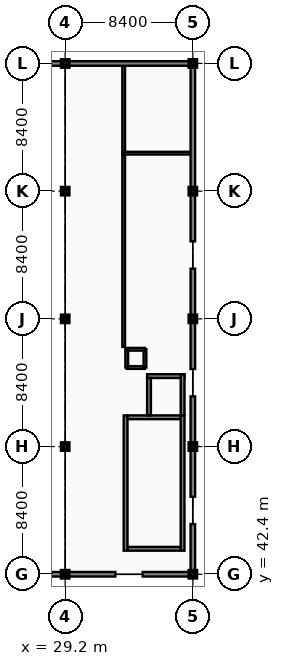
"""IFC4 building model, lengths in metres.
Left out: names, types, materials, properties, quantities, classifications, styles, units other than length and angle.
Written with IfcOpenShell. Run it as: python <this file> out.ifc"""

import sys

from ifc_helpers import new_model, si_unit, direction, frame, frame_2d, origin, origin_2d, place, context, subcontext, project, spatial, rectangle, extrude, element, fill, save


model = new_model("IFC4")
c1 = context("Model", 3, precision=1e-05, world=origin(), true_north=direction((0.0, 1.0)))
c2 = subcontext(c1, "Body", "Model", "MODEL_VIEW")
j1 = project(units=[si_unit("LENGTHUNIT", "METRE"), si_unit("PLANEANGLEUNIT", "RADIAN")], contexts=[c1])
p1 = place(None, origin())
s1 = spatial("IfcSite", under=j1, at=p1, CompositionType="ELEMENT")
p2 = place(p1, origin())
s2 = spatial("IfcBuilding", under=s1, at=p2, CompositionType="ELEMENT")
p3 = place(p2, frame((0.0, 0.0, 9.6)))
s3 = spatial("IfcBuildingStorey", under=s2, at=p3, CompositionType="ELEMENT", Elevation=9.6)
for number, where, z_axis, x_axis in (
    (1, (29.2, 42.4, 0.0), (0.0, 0.0, 1.0), (1.0, 0.0, 0.0)),
    (2, (29.2, 50.8, 0.0), (0.0, 0.0, 1.0), (1.0, 0.0, 0.0)),
    (3, (29.2, 59.2, 0.0), (0.0, 0.0, 1.0), (1.0, 0.0, 0.0)),
    (4, (29.2, 67.6, 0.0), (0.0, 0.0, 1.0), (1.0, 0.0, 0.0)),
    (5, (29.2, 76.0, 0.0), (0.0, 0.0, 1.0), (1.0, 0.0, 0.0)),
    (6, (37.6, 42.4, 0.0), (0.0, 0.0, 1.0), (1.0, 0.0, 0.0)),
    (7, (37.6, 50.8, 0.0), (0.0, 0.0, 1.0), (1.0, 0.0, 0.0)),
    (8, (37.6, 59.2, 0.0), (0.0, 0.0, 1.0), (1.0, 0.0, 0.0)),
    (9, (37.6, 67.6, 0.0), (0.0, 0.0, 1.0), (1.0, 0.0, 0.0)),
    (10, (37.6, 76.0, 0.0), (0.0, 0.0, 1.0), (1.0, 0.0, 0.0)),
):
    element("IfcColumn", number, at=place(p3, frame(where, z_axis=z_axis, x_axis=x_axis)), inside=s3, PredefinedType="COLUMN", context=c2, shape_type="SweptSolid", body=[
        extrude(rectangle(XDim=0.4, YDim=0.4, at=origin_2d()), origin(), (0.0, 0.0, 1.0), 4.2),
    ])
p4 = place(p3, frame((33.05, 57.35, 0.0), z_axis=(0.0, 0.0, 1.0), x_axis=(0.0, 1.0, 0.0)))
e11 = element("IfcWall", 11, at=p4, inside=s3, PredefinedType="PARTITIONING", context=c2, shape_type="SweptSolid", body=[
    extrude(rectangle(XDim=12.75, YDim=0.18, at=frame_2d((6.375, 0.0))), origin(), (0.0, 0.0, 1.0), 3.31),
])
p5 = place(p4, frame((5.875, 0.0, -0.01)))
e12 = element("IfcOpeningElement", 12, at=p5, cuts=e11, PredefinedType="OPENING", context=c2, shape_type="SweptSolid", body=[
    extrude(rectangle(XDim=1.0, YDim=2.16, at=frame_2d((0.5, 1.08))), frame((0.0, 0.1, 0.0), z_axis=(0.0, -1.0, 0.0), x_axis=(1.0, 0.0, 0.0)), (0.0, 0.0, 1.0), 0.2),
])
p6 = place(p3, frame((33.05, 70.1, 0.0), z_axis=(0.0, 0.0, 1.0), x_axis=(0.0, 1.0, 0.0)))
e13 = element("IfcWall", 13, at=p6, inside=s3, PredefinedType="PARTITIONING", context=c2, shape_type="SweptSolid", body=[
    extrude(rectangle(XDim=5.76, YDim=0.18, at=frame_2d((2.88, 0.0))), origin(), (0.0, 0.0, 1.0), 3.31),
])
p7 = place(p6, frame((2.38, 0.0, -0.01)))
e14 = element("IfcOpeningElement", 14, at=p7, cuts=e13, PredefinedType="OPENING", context=c2, shape_type="SweptSolid", body=[
    extrude(rectangle(XDim=1.0, YDim=2.16, at=frame_2d((0.5, 1.08))), frame((0.0, 0.1, 0.0), z_axis=(0.0, -1.0, 0.0), x_axis=(1.0, 0.0, 0.0)), (0.0, 0.0, 1.0), 0.2),
])
p8 = place(p3, frame((33.05, 70.1, 0.0), z_axis=(0.0, 0.0, 1.0), x_axis=(1.0, 0.0, 0.0)))
e15 = element("IfcWall", 15, at=p8, inside=s3, PredefinedType="PARTITIONING", context=c2, shape_type="SweptSolid", body=[
    extrude(rectangle(XDim=4.41, YDim=0.18, at=frame_2d((2.205, 0.0))), origin(), (0.0, 0.0, 1.0), 3.39),
])
for number, where, z_axis, x_axis in (
    (16, (25.9, 42.4, 0.0), (0.0, 0.0, 1.0), (1.0, 0.0, 0.0)),
    (17, (29.2, 42.4, 0.0), (0.0, 0.0, 1.0), (1.0, 0.0, 0.0)),
    (18, (34.3, 42.4, 0.0), (0.0, 0.0, 1.0), (1.0, 0.0, 0.0)),
    (19, (29.2, 76.0, 0.0), (0.0, 0.0, 1.0), (-1.0, 0.0, 0.0)),
):
    element("IfcWall", number, at=place(p3, frame(where, z_axis=z_axis, x_axis=x_axis)), inside=s3, PredefinedType="SOLIDWALL", context=c2, shape_type="SweptSolid", body=[
        extrude(rectangle(XDim=3.3, YDim=0.3, at=frame_2d((1.65, 0.0))), origin(), (0.0, 0.0, 1.0), 3.31),
    ])
p9 = place(p3, frame((37.6, 76.0, 0.0), z_axis=(0.0, 0.0, 1.0), x_axis=(-1.0, 0.0, 0.0)))
e20 = element("IfcWall", 20, at=p9, inside=s3, PredefinedType="SOLIDWALL", context=c2, shape_type="SweptSolid", body=[
    extrude(rectangle(XDim=8.4, YDim=0.3, at=frame_2d((4.2, 0.0))), origin(), (0.0, 0.0, 1.0), 3.31),
])
p10 = place(p9, frame((0.46, 0.0, 0.85)))
e21 = element("IfcOpeningElement", 21, at=p10, cuts=e20, PredefinedType="OPENING", context=c2, shape_type="SweptSolid", body=[
    extrude(rectangle(XDim=0.9, YDim=2.1, at=frame_2d((0.45, 1.05))), frame((0.0, 0.16, 0.0), z_axis=(0.0, -1.0, 0.0), x_axis=(1.0, 0.0, 0.0)), (0.0, 0.0, 1.0), 0.32),
])
p11 = place(p9, frame((6.86, 0.0, 0.85)))
e22 = element("IfcOpeningElement", 22, at=p11, cuts=e20, PredefinedType="OPENING", context=c2, shape_type="SweptSolid", body=[
    extrude(rectangle(XDim=0.9, YDim=2.1, at=frame_2d((0.45, 1.05))), frame((0.0, 0.16, 0.0), z_axis=(0.0, -1.0, 0.0), x_axis=(1.0, 0.0, 0.0)), (0.0, 0.0, 1.0), 0.32),
])
for number, where, z_axis, x_axis in (
    (23, (37.6, 42.4, 0.0), (0.0, 0.0, 1.0), (0.0, 1.0, 0.0)),
    (24, (37.6, 47.5, 0.0), (0.0, 0.0, 1.0), (0.0, 1.0, 0.0)),
    (25, (37.6, 50.8, 0.0), (0.0, 0.0, 1.0), (0.0, 1.0, 0.0)),
    (26, (37.6, 55.9, 0.0), (0.0, 0.0, 1.0), (0.0, 1.0, 0.0)),
    (27, (37.6, 59.2, 0.0), (0.0, 0.0, 1.0), (0.0, 1.0, 0.0)),
    (28, (37.6, 64.3, 0.0), (0.0, 0.0, 1.0), (0.0, 1.0, 0.0)),
):
    element("IfcWall", number, at=place(p3, frame(where, z_axis=z_axis, x_axis=x_axis)), inside=s3, PredefinedType="SOLIDWALL", context=c2, shape_type="SweptSolid", body=[
        extrude(rectangle(XDim=3.3, YDim=0.3, at=frame_2d((1.65, 0.0))), origin(), (0.0, 0.0, 1.0), 3.31),
    ])
p12 = place(p3, frame((37.6, 67.6, 0.0), z_axis=(0.0, 0.0, 1.0), x_axis=(0.0, 1.0, 0.0)))
e29 = element("IfcWall", 29, at=p12, inside=s3, PredefinedType="SOLIDWALL", context=c2, shape_type="SweptSolid", body=[
    extrude(rectangle(XDim=8.4, YDim=0.3, at=frame_2d((4.2, 0.0))), origin(), (0.0, 0.0, 1.0), 3.31),
])
p13 = place(p12, frame((0.46, 0.0, 0.85)))
e30 = element("IfcOpeningElement", 30, at=p13, cuts=e29, PredefinedType="OPENING", context=c2, shape_type="SweptSolid", body=[
    extrude(rectangle(XDim=0.9, YDim=2.1, at=frame_2d((0.45, 1.05))), frame((0.0, 0.16, 0.0), z_axis=(0.0, -1.0, 0.0), x_axis=(1.0, 0.0, 0.0)), (0.0, 0.0, 1.0), 0.32),
])
p14 = place(p12, frame((6.86, 0.0, 0.85)))
e31 = element("IfcOpeningElement", 31, at=p14, cuts=e29, PredefinedType="OPENING", context=c2, shape_type="SweptSolid", body=[
    extrude(rectangle(XDim=0.9, YDim=2.1, at=frame_2d((0.45, 1.05))), frame((0.0, 0.16, 0.0), z_axis=(0.0, -1.0, 0.0), x_axis=(1.0, 0.0, 0.0)), (0.0, 0.0, 1.0), 0.32),
])
p15 = place(p3, frame((33.3, 44.075, 0.0), z_axis=(0.0, 0.0, 1.0), x_axis=(1.0, 0.0, 0.0)))
e32 = element("IfcWall", 32, at=p15, inside=s3, PredefinedType="SHEAR", context=c2, shape_type="SweptSolid", body=[
    extrude(rectangle(XDim=3.5, YDim=0.25, at=frame_2d((1.75, 0.0))), origin(), (0.0, 0.0, 1.0), 4.2),
])
p16 = place(p15, frame((1.1, 0.0, -0.01)))
e33 = element("IfcOpeningElement", 33, at=p16, cuts=e32, PredefinedType="OPENING", context=c2, shape_type="SweptSolid", body=[
    extrude(rectangle(XDim=1.3, YDim=2.16, at=frame_2d((0.65, 1.08))), frame((0.0, 0.135, 0.0), z_axis=(0.0, -1.0, 0.0), x_axis=(1.0, 0.0, 0.0)), (0.0, 0.0, 1.0), 0.27),
])
p17 = place(p3, frame((33.175, 43.95, 0.0), z_axis=(0.0, 0.0, 1.0), x_axis=(0.0, 1.0, 0.0)))
e34 = element("IfcWall", 34, at=p17, inside=s3, PredefinedType="SHEAR", context=c2, shape_type="SweptSolid", body=[
    extrude(rectangle(XDim=8.9, YDim=0.25, at=frame_2d((4.45, 0.0))), origin(), (0.0, 0.0, 1.0), 4.2),
])
p18 = place(p3, frame((36.8, 52.725, 0.0), z_axis=(0.0, 0.0, 1.0), x_axis=(-1.0, 0.0, 0.0)))
e35 = element("IfcWall", 35, at=p18, inside=s3, PredefinedType="SHEAR", context=c2, shape_type="SweptSolid", body=[
    extrude(rectangle(XDim=3.5, YDim=0.25, at=frame_2d((1.75, 0.0))), origin(), (0.0, 0.0, 1.0), 4.2),
])
p19 = place(p3, frame((36.925, 43.95, 0.0), z_axis=(0.0, 0.0, 1.0), x_axis=(0.0, 1.0, 0.0)))
e36 = element("IfcWall", 36, at=p19, inside=s3, PredefinedType="SHEAR", context=c2, shape_type="SweptSolid", body=[
    extrude(rectangle(XDim=8.9, YDim=0.25, at=frame_2d((4.45, 0.0))), origin(), (0.0, 0.0, 1.0), 4.2),
])
p20 = place(p3, frame((34.59, 55.435, 0.0), z_axis=(0.0, 0.0, 1.0), x_axis=(1.0, 0.0, 0.0)))
e37 = element("IfcWall", 37, at=p20, inside=s3, PredefinedType="SHEAR", context=c2, shape_type="SweptSolid", body=[
    extrude(rectangle(XDim=2.46, YDim=0.25, at=frame_2d((1.23, 0.0))), origin(), (0.0, 0.0, 1.0), 4.2),
])
p21 = place(p3, frame((34.715, 52.85, 0.0), z_axis=(0.0, 0.0, 1.0), x_axis=(0.0, 1.0, 0.0)))
e38 = element("IfcWall", 38, at=p21, inside=s3, PredefinedType="SHEAR", context=c2, shape_type="SweptSolid", body=[
    extrude(rectangle(XDim=2.46, YDim=0.25, at=frame_2d((1.23, 0.0))), origin(), (0.0, 0.0, 1.0), 4.2),
])
p22 = place(p21, frame((0.68, 0.0, -0.01)))
e39 = element("IfcOpeningElement", 39, at=p22, cuts=e38, PredefinedType="OPENING", context=c2, shape_type="SweptSolid", body=[
    extrude(rectangle(XDim=1.1, YDim=2.16, at=frame_2d((0.55, 1.08))), frame((0.0, 0.135, 0.0), z_axis=(0.0, -1.0, 0.0), x_axis=(1.0, 0.0, 0.0)), (0.0, 0.0, 1.0), 0.27),
])
p23 = place(p3, frame((36.925, 52.85, 0.0), z_axis=(0.0, 0.0, 1.0), x_axis=(0.0, 1.0, 0.0)))
e40 = element("IfcWall", 40, at=p23, inside=s3, PredefinedType="SHEAR", context=c2, shape_type="SweptSolid", body=[
    extrude(rectangle(XDim=2.71, YDim=0.25, at=frame_2d((1.355, 0.0))), origin(), (0.0, 0.0, 1.0), 4.2),
])
for number, where, z_axis, x_axis in (
    (41, (33.25, 56.0, 0.0), (0.0, 0.0, 1.0), (1.0, 0.0, 0.0)),
    (42, (34.45, 56.0, 0.0), (0.0, 0.0, 1.0), (0.0, 1.0, 0.0)),
    (43, (34.45, 57.2, 0.0), (0.0, 0.0, 1.0), (-1.0, 0.0, 0.0)),
):
    element("IfcWall", number, at=place(p3, frame(where, z_axis=z_axis, x_axis=x_axis)), inside=s3, PredefinedType="SOLIDWALL", context=c2, shape_type="SweptSolid", body=[
        extrude(rectangle(XDim=1.2, YDim=0.18, at=frame_2d((0.6, 0.0))), origin(), (0.0, 0.0, 1.0), 3.97),
    ])
p24 = place(p3, frame((33.25, 57.2, 0.0), z_axis=(0.0, 0.0, 1.0), x_axis=(0.0, -1.0, 0.0)))
e44 = element("IfcWall", 44, at=p24, inside=s3, PredefinedType="SOLIDWALL", context=c2, shape_type="SweptSolid", body=[
    extrude(rectangle(XDim=1.2, YDim=0.18, at=frame_2d((0.6, 0.0))), origin(), (0.0, 0.0, 1.0), 3.97),
])
p25 = place(p24, frame((0.2, 0.0, -0.01)))
e45 = element("IfcOpeningElement", 45, at=p25, cuts=e44, PredefinedType="OPENING", context=c2, shape_type="SweptSolid", body=[
    extrude(rectangle(XDim=0.8, YDim=2.06, at=frame_2d((0.4, 1.03))), frame((0.0, 0.1, 0.0), z_axis=(0.0, -1.0, 0.0), x_axis=(1.0, 0.0, 0.0)), (0.0, 0.0, 1.0), 0.2),
])
p26 = place(p5, frame((0.0, 0.0, 0.01)))
e46 = element("IfcDoor", 46, at=p26, inside=s3, OperationType="SINGLE_SWING_LEFT", PredefinedType="DOOR", context=c2, shape_type="SweptSolid", body=[
    extrude(rectangle(XDim=1.0, YDim=2.15, at=frame_2d((0.5, 1.075))), frame((0.0, 0.025, 0.0), z_axis=(0.0, -1.0, 0.0), x_axis=(1.0, 0.0, 0.0)), (0.0, 0.0, 1.0), 0.05),
])
fill(e12, e46)
p27 = place(p7, frame((1.0, 0.0, 0.01), z_axis=(0.0, 0.0, 1.0), x_axis=(-1.0, 0.0, 0.0)))
e47 = element("IfcDoor", 47, at=p27, inside=s3, OperationType="SINGLE_SWING_RIGHT", PredefinedType="DOOR", context=c2, shape_type="SweptSolid", body=[
    extrude(rectangle(XDim=1.0, YDim=2.15, at=frame_2d((0.5, 1.075))), frame((0.0, 0.025, 0.0), z_axis=(0.0, -1.0, 0.0), x_axis=(1.0, 0.0, 0.0)), (0.0, 0.0, 1.0), 0.05),
])
fill(e14, e47)
p28 = place(p10, origin())
e48 = element("IfcWindow", 48, at=p28, inside=s3, PartitioningType="SINGLE_PANEL", PredefinedType="WINDOW", context=c2, shape_type="SweptSolid", body=[
    extrude(rectangle(XDim=0.9, YDim=2.1, at=frame_2d((0.45, 1.05))), frame((0.0, 0.03, 0.0), z_axis=(0.0, -1.0, 0.0), x_axis=(1.0, 0.0, 0.0)), (0.0, 0.0, 1.0), 0.06),
])
fill(e21, e48)
p29 = place(p11, origin())
e49 = element("IfcWindow", 49, at=p29, inside=s3, PartitioningType="SINGLE_PANEL", PredefinedType="WINDOW", context=c2, shape_type="SweptSolid", body=[
    extrude(rectangle(XDim=0.9, YDim=2.1, at=frame_2d((0.45, 1.05))), frame((0.0, 0.03, 0.0), z_axis=(0.0, -1.0, 0.0), x_axis=(1.0, 0.0, 0.0)), (0.0, 0.0, 1.0), 0.06),
])
fill(e22, e49)
p30 = place(p13, origin())
e50 = element("IfcWindow", 50, at=p30, inside=s3, PartitioningType="SINGLE_PANEL", PredefinedType="WINDOW", context=c2, shape_type="SweptSolid", body=[
    extrude(rectangle(XDim=0.9, YDim=2.1, at=frame_2d((0.45, 1.05))), frame((0.0, 0.03, 0.0), z_axis=(0.0, -1.0, 0.0), x_axis=(1.0, 0.0, 0.0)), (0.0, 0.0, 1.0), 0.06),
])
fill(e30, e50)
p31 = place(p14, origin())
e51 = element("IfcWindow", 51, at=p31, inside=s3, PartitioningType="SINGLE_PANEL", PredefinedType="WINDOW", context=c2, shape_type="SweptSolid", body=[
    extrude(rectangle(XDim=0.9, YDim=2.1, at=frame_2d((0.45, 1.05))), frame((0.0, 0.03, 0.0), z_axis=(0.0, -1.0, 0.0), x_axis=(1.0, 0.0, 0.0)), (0.0, 0.0, 1.0), 0.06),
])
fill(e31, e51)
p32 = place(p16, frame((1.3, 0.0, 0.01), z_axis=(0.0, 0.0, 1.0), x_axis=(-1.0, 0.0, 0.0)))
e52 = element("IfcDoor", 52, at=p32, inside=s3, OperationType="SINGLE_SWING_LEFT", PredefinedType="DOOR", context=c2, shape_type="SweptSolid", body=[
    extrude(rectangle(XDim=1.3, YDim=2.15, at=frame_2d((0.65, 1.075))), frame((0.0, 0.025, 0.0), z_axis=(0.0, -1.0, 0.0), x_axis=(1.0, 0.0, 0.0)), (0.0, 0.0, 1.0), 0.05),
])
fill(e33, e52)
p33 = place(p22, frame((0.0, 0.0, 0.01)))
e53 = element("IfcDoor", 53, at=p33, inside=s3, OperationType="SLIDING_TO_LEFT", PredefinedType="DOOR", context=c2, shape_type="SweptSolid", body=[
    extrude(rectangle(XDim=1.1, YDim=2.15, at=frame_2d((0.55, 1.075))), frame((0.0, 0.025, 0.0), z_axis=(0.0, -1.0, 0.0), x_axis=(1.0, 0.0, 0.0)), (0.0, 0.0, 1.0), 0.05),
])
fill(e39, e53)
p34 = place(p25, frame((0.0, 0.0, 0.01)))
e54 = element("IfcDoor", 54, at=p34, inside=s3, OperationType="SINGLE_SWING_LEFT", PredefinedType="DOOR", context=c2, shape_type="SweptSolid", body=[
    extrude(rectangle(XDim=0.8, YDim=2.05, at=frame_2d((0.4, 1.025))), frame((0.0, 0.025, 0.0), z_axis=(0.0, -1.0, 0.0), x_axis=(1.0, 0.0, 0.0)), (0.0, 0.0, 1.0), 0.05),
])
fill(e45, e54)
save(model, sys.argv[1])
